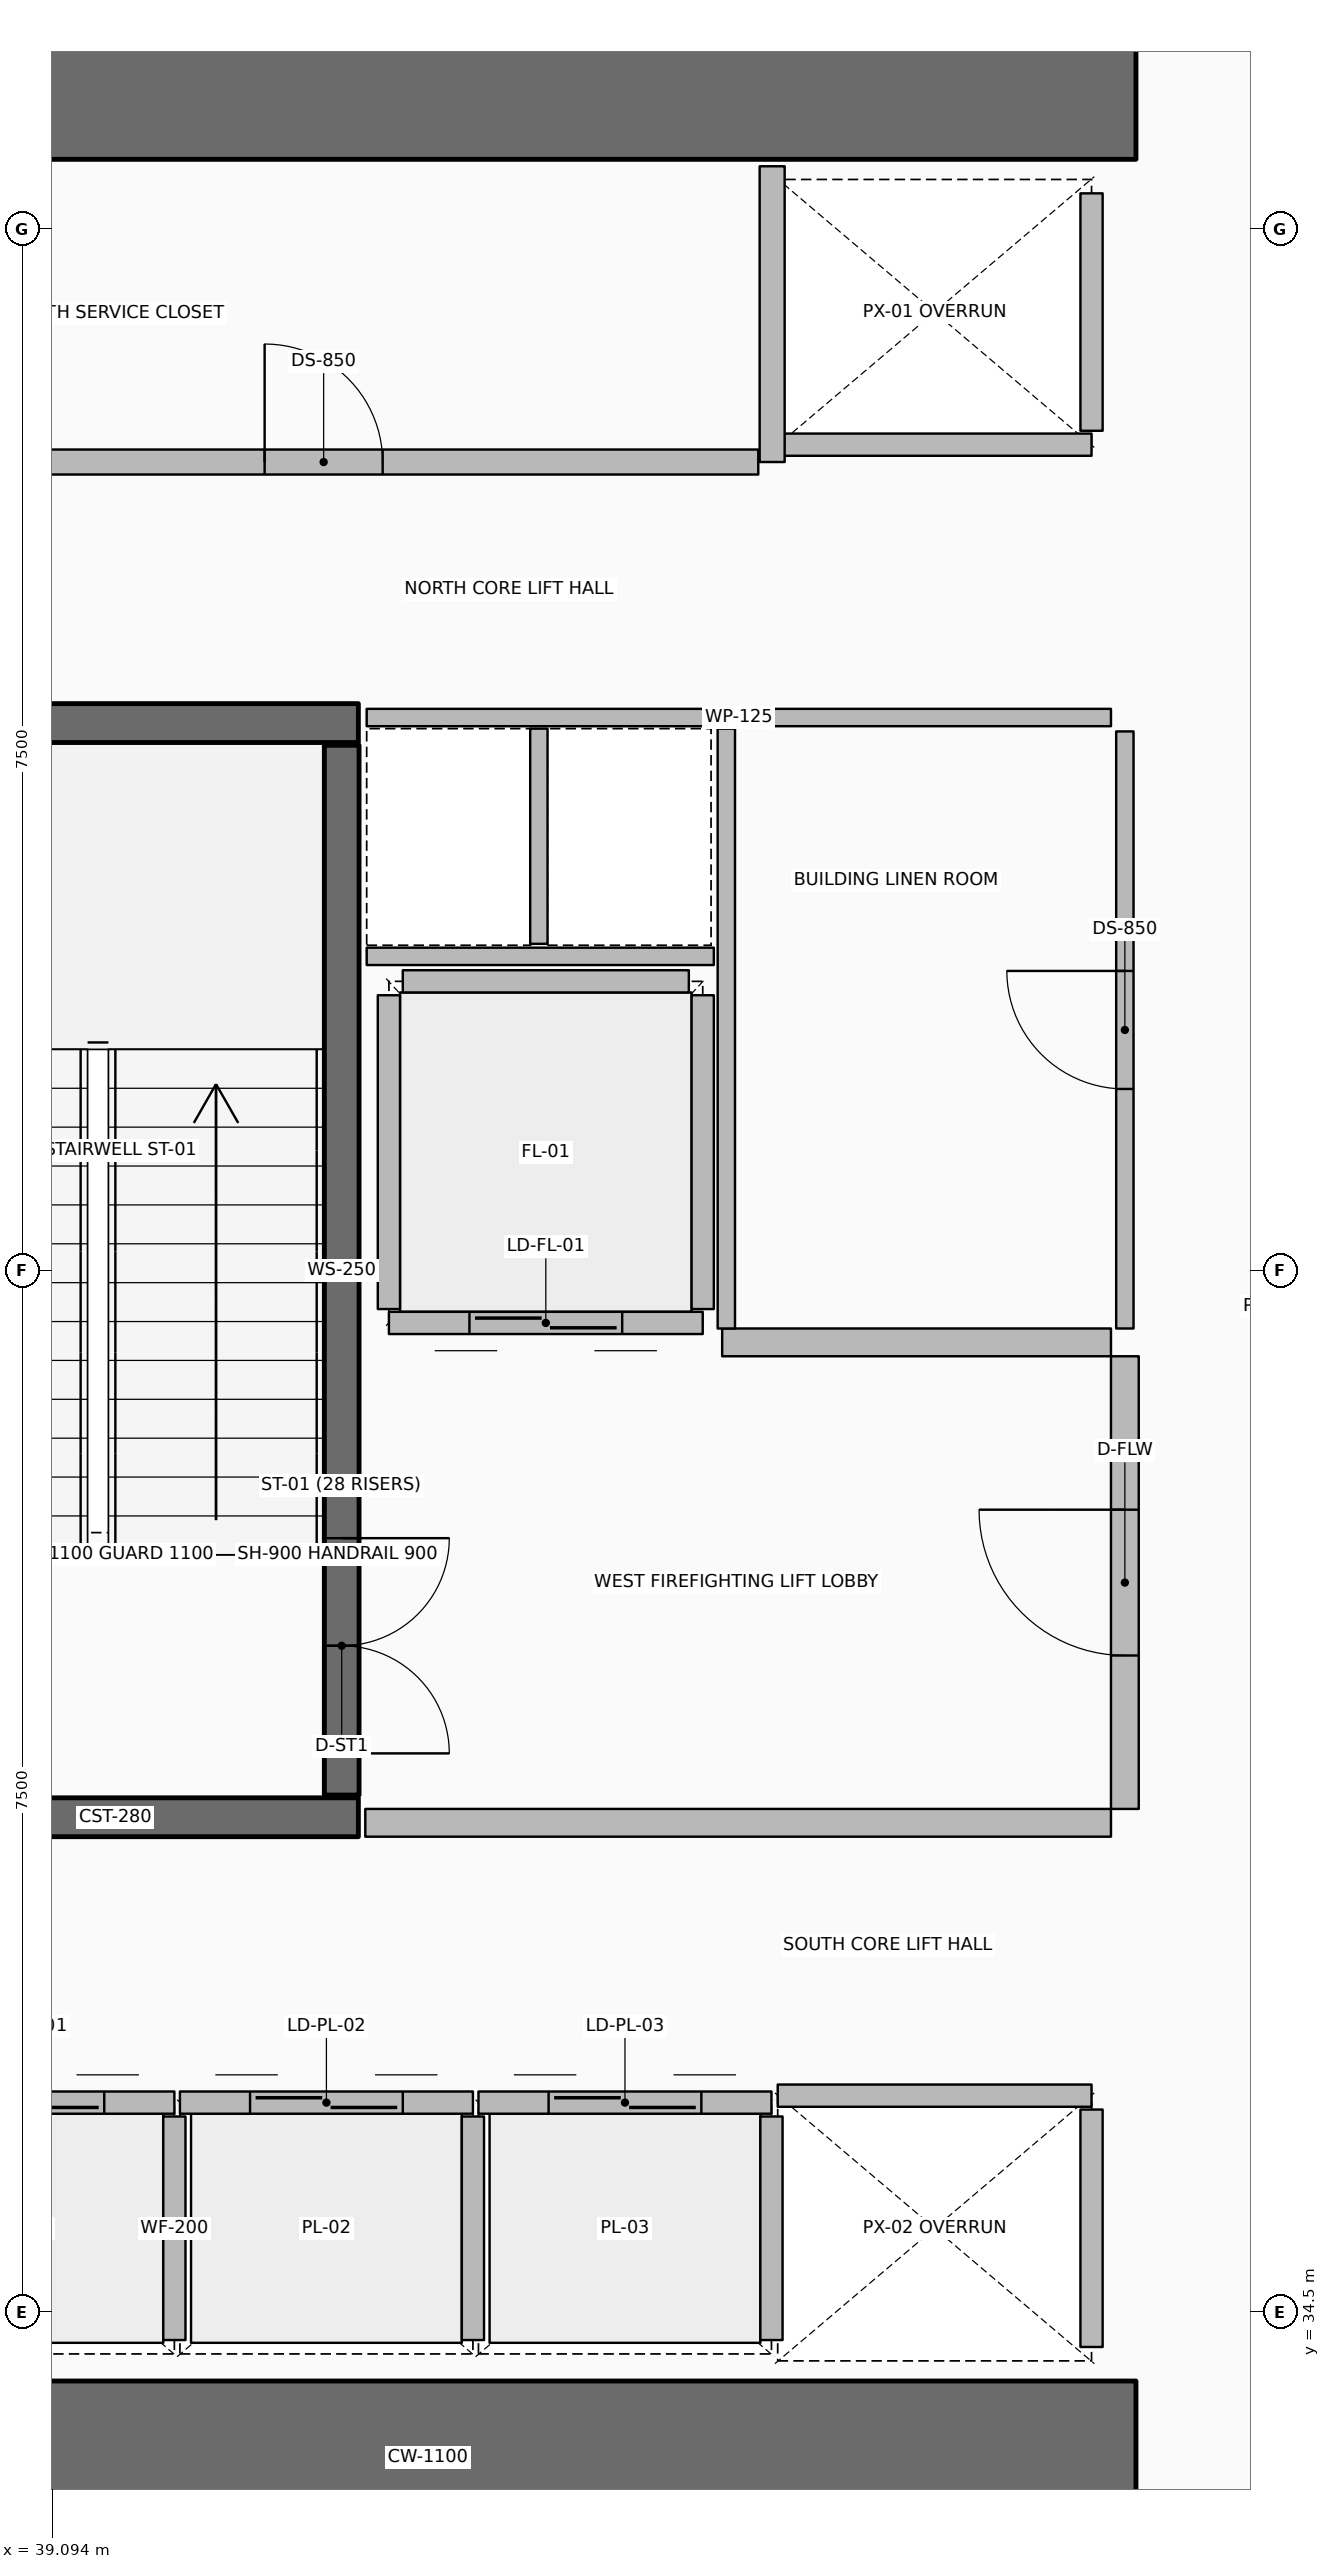
"""IFC4 building model, lengths in metres.
Left out: names, types, materials, properties, quantities, classifications, styles, units other than length and angle.
Written with IfcOpenShell. Run it as: python <this file> out.ifc"""

import sys

from ifc_helpers import new_model, si_unit, direction, frame, frame_2d, origin, origin_2d, place, context, subcontext, project, spatial, rectangle, hollow_rectangle, extrude, element, fill, save


model = new_model("IFC4")
c1 = context("Model", 3, precision=1e-05, world=origin(), true_north=direction((0.0, 1.0)))
c2 = subcontext(c1, "Body", "Model", "MODEL_VIEW")
j1 = project(units=[si_unit("LENGTHUNIT", "METRE"), si_unit("PLANEANGLEUNIT", "RADIAN")], contexts=[c1])
p1 = place(None, origin())
s1 = spatial("IfcSite", under=j1, at=p1, CompositionType="ELEMENT")
p2 = place(p1, origin())
s2 = spatial("IfcBuilding", under=s1, at=p2, CompositionType="ELEMENT")
p3 = place(p2, frame((0.0, 0.0, 7.2)))
s3 = spatial("IfcBuildingStorey", under=s2, at=p3, CompositionType="ELEMENT", Elevation=7.2)
for number, where, z_axis, x_axis in (
    (1, (36.7, 33.45, 0.0), (0.0, 0.0, 1.0), (1.0, 0.0, 0.0)),
    (2, (36.7, 50.55, 0.0), (0.0, 0.0, 1.0), (1.0, 0.0, 0.0)),
):
    element("IfcWall", number, at=place(p3, frame(where, z_axis=z_axis, x_axis=x_axis)), inside=s3, PredefinedType="SHEAR", context=c2, shape_type="SweptSolid", body=[
        extrude(rectangle(XDim=10.2, YDim=1.1, at=frame_2d((5.1, 0.0))), origin(), (0.0, 0.0, 1.0), 4.8),
    ])
for number, where, z_axis, x_axis in (
    (3, (37.8, 38.06, 0.0), (0.0, 0.0, 1.0), (1.0, 0.0, 0.0)),
    (4, (37.8, 45.94, 0.0), (0.0, 0.0, 1.0), (1.0, 0.0, 0.0)),
):
    element("IfcWall", number, at=place(p3, frame(where, z_axis=z_axis, x_axis=x_axis)), inside=s3, PredefinedType="SHEAR", context=c2, shape_type="SweptSolid", body=[
        extrude(rectangle(XDim=3.5, YDim=0.28, at=frame_2d((1.75, 0.0))), origin(), (0.0, 0.0, 1.0), 4.8),
    ])
p4 = place(p3, frame((41.18, 43.59, 0.0), z_axis=(0.0, 0.0, 1.0), x_axis=(1.0, 0.0, 0.0)))
e5 = element("IfcColumn", 5, at=p4, inside=s3, PredefinedType="COLUMN", context=c2, shape_type="SweptSolid", body=[
    extrude(hollow_rectangle(XDim=0.2, YDim=0.2, WallThickness=0.01, InnerFilletRadius=0.01, OuterFilletRadius=0.02, at=origin_2d()), origin(), (0.0, 0.0, 1.0), 2.195),
])
p5 = place(p3, frame((41.18, 38.22, 0.0), z_axis=(0.0, 0.0, 1.0), x_axis=(0.0, 1.0, 0.0)))
e6 = element("IfcWall", 6, at=p5, inside=s3, PredefinedType="SOLIDWALL", context=c2, shape_type="SweptSolid", body=[
    extrude(rectangle(XDim=7.56, YDim=0.25, at=frame_2d((3.78, 0.0))), origin(), (0.0, 0.0, 1.0), 4.48),
])
p6 = place(p5, frame((0.3, 0.0, 0.0)))
e7 = element("IfcOpeningElement", 7, at=p6, cuts=e6, PredefinedType="OPENING", context=c2, shape_type="SweptSolid", body=[
    extrude(rectangle(XDim=1.55, YDim=2.15, at=frame_2d((0.775, 1.075))), frame((0.0, 0.135, 0.0), z_axis=(0.0, -1.0, 0.0), x_axis=(1.0, 0.0, 0.0)), (0.0, 0.0, 1.0), 0.27),
])
p7 = place(p3, frame((37.865, 36.005, 0.0), z_axis=(0.0, 0.0, 1.0), x_axis=(1.0, 0.0, 0.0)))
e8 = element("IfcWall", 8, at=p7, inside=s3, PredefinedType="PARTITIONING", context=c2, shape_type="SweptSolid", body=[
    extrude(rectangle(XDim=2.11, YDim=0.16, at=frame_2d((1.055, 0.0))), origin(), (0.0, 0.0, 1.0), 4.48),
])
p8 = place(p7, frame((0.505, 0.0, 0.0)))
e9 = element("IfcOpeningElement", 9, at=p8, cuts=e8, PredefinedType="OPENING", context=c2, shape_type="SweptSolid", body=[
    extrude(rectangle(XDim=1.1, YDim=2.1, at=frame_2d((0.55, 1.05))), frame((0.0, 0.09, 0.0), z_axis=(0.0, -1.0, 0.0), x_axis=(1.0, 0.0, 0.0)), (0.0, 0.0, 1.0), 0.18),
])
p9 = place(p3, frame((39.975, 34.295, 0.0), z_axis=(0.0, 0.0, 1.0), x_axis=(0.0, 1.0, 0.0)))
e10 = element("IfcWall", 10, at=p9, inside=s3, PredefinedType="PARTITIONING", context=c2, shape_type="SweptSolid", body=[
    extrude(rectangle(XDim=1.61, YDim=0.16, at=frame_2d((0.805, 0.0))), origin(), (0.0, 0.0, 1.0), 4.48),
])
p10 = place(p3, frame((40.015, 36.005, 0.0), z_axis=(0.0, 0.0, 1.0), x_axis=(1.0, 0.0, 0.0)))
e11 = element("IfcWall", 11, at=p10, inside=s3, PredefinedType="PARTITIONING", context=c2, shape_type="SweptSolid", body=[
    extrude(rectangle(XDim=2.11, YDim=0.16, at=frame_2d((1.055, 0.0))), origin(), (0.0, 0.0, 1.0), 4.48),
])
p11 = place(p10, frame((0.505, 0.0, 0.0)))
e12 = element("IfcOpeningElement", 12, at=p11, cuts=e11, PredefinedType="OPENING", context=c2, shape_type="SweptSolid", body=[
    extrude(rectangle(XDim=1.1, YDim=2.1, at=frame_2d((0.55, 1.05))), frame((0.0, 0.09, 0.0), z_axis=(0.0, -1.0, 0.0), x_axis=(1.0, 0.0, 0.0)), (0.0, 0.0, 1.0), 0.18),
])
p12 = place(p3, frame((42.125, 34.295, 0.0), z_axis=(0.0, 0.0, 1.0), x_axis=(0.0, 1.0, 0.0)))
e13 = element("IfcWall", 13, at=p12, inside=s3, PredefinedType="PARTITIONING", context=c2, shape_type="SweptSolid", body=[
    extrude(rectangle(XDim=1.61, YDim=0.16, at=frame_2d((0.805, 0.0))), origin(), (0.0, 0.0, 1.0), 4.48),
])
p13 = place(p3, frame((42.165, 36.005, 0.0), z_axis=(0.0, 0.0, 1.0), x_axis=(1.0, 0.0, 0.0)))
e14 = element("IfcWall", 14, at=p13, inside=s3, PredefinedType="PARTITIONING", context=c2, shape_type="SweptSolid", body=[
    extrude(rectangle(XDim=2.11, YDim=0.16, at=frame_2d((1.055, 0.0))), origin(), (0.0, 0.0, 1.0), 4.48),
])
p14 = place(p13, frame((0.505, 0.0, 0.0)))
e15 = element("IfcOpeningElement", 15, at=p14, cuts=e14, PredefinedType="OPENING", context=c2, shape_type="SweptSolid", body=[
    extrude(rectangle(XDim=1.1, YDim=2.1, at=frame_2d((0.55, 1.05))), frame((0.0, 0.09, 0.0), z_axis=(0.0, -1.0, 0.0), x_axis=(1.0, 0.0, 0.0)), (0.0, 0.0, 1.0), 0.18),
])
p15 = place(p3, frame((44.275, 34.295, 0.0), z_axis=(0.0, 0.0, 1.0), x_axis=(0.0, 1.0, 0.0)))
e16 = element("IfcWall", 16, at=p15, inside=s3, PredefinedType="PARTITIONING", context=c2, shape_type="SweptSolid", body=[
    extrude(rectangle(XDim=1.61, YDim=0.16, at=frame_2d((0.805, 0.0))), origin(), (0.0, 0.0, 1.0), 4.48),
])
p16 = place(p3, frame((46.58, 47.945, 0.0), z_axis=(0.0, 0.0, 1.0), x_axis=(-1.0, 0.0, 0.0)))
e17 = element("IfcWall", 17, at=p16, inside=s3, PredefinedType="PARTITIONING", context=c2, shape_type="SweptSolid", body=[
    extrude(rectangle(XDim=2.26, YDim=0.16, at=frame_2d((1.13, 0.0))), origin(), (0.0, 0.0, 1.0), 4.48),
])
p17 = place(p3, frame((46.58, 48.045, 0.0), z_axis=(0.0, 0.0, 1.0), x_axis=(0.0, 1.0, 0.0)))
e18 = element("IfcWall", 18, at=p17, inside=s3, PredefinedType="PARTITIONING", context=c2, shape_type="SweptSolid", body=[
    extrude(rectangle(XDim=1.71, YDim=0.16, at=frame_2d((0.855, 0.0))), origin(), (0.0, 0.0, 1.0), 4.48),
])
p18 = place(p3, frame((44.32, 36.055, 0.0), z_axis=(0.0, 0.0, 1.0), x_axis=(1.0, 0.0, 0.0)))
e19 = element("IfcWall", 19, at=p18, inside=s3, PredefinedType="PARTITIONING", context=c2, shape_type="SweptSolid", body=[
    extrude(rectangle(XDim=2.26, YDim=0.16, at=frame_2d((1.13, 0.0))), origin(), (0.0, 0.0, 1.0), 4.48),
])
p19 = place(p3, frame((46.58, 34.245, 0.0), z_axis=(0.0, 0.0, 1.0), x_axis=(0.0, 1.0, 0.0)))
e20 = element("IfcWall", 20, at=p19, inside=s3, PredefinedType="PARTITIONING", context=c2, shape_type="SweptSolid", body=[
    extrude(rectangle(XDim=1.71, YDim=0.16, at=frame_2d((0.855, 0.0))), origin(), (0.0, 0.0, 1.0), 4.48),
])
p20 = place(p3, frame((43.78, 41.62, 0.0), z_axis=(0.0, 0.0, 1.0), x_axis=(-1.0, 0.0, 0.0)))
e21 = element("IfcWall", 21, at=p20, inside=s3, PredefinedType="PARTITIONING", context=c2, shape_type="SweptSolid", body=[
    extrude(rectangle(XDim=2.26, YDim=0.16, at=frame_2d((1.13, 0.0))), origin(), (0.0, 0.0, 1.0), 4.48),
])
p21 = place(p20, frame((0.58, 0.0, 0.0)))
e22 = element("IfcOpeningElement", 22, at=p21, cuts=e21, PredefinedType="OPENING", context=c2, shape_type="SweptSolid", body=[
    extrude(rectangle(XDim=1.1, YDim=2.1, at=frame_2d((0.55, 1.05))), frame((0.0, 0.09, 0.0), z_axis=(0.0, -1.0, 0.0), x_axis=(1.0, 0.0, 0.0)), (0.0, 0.0, 1.0), 0.18),
])
for number, where, z_axis, x_axis in (
    (23, (43.78, 41.72, 0.0), (0.0, 0.0, 1.0), (0.0, 1.0, 0.0)),
    (24, (41.52, 41.72, 0.0), (0.0, 0.0, 1.0), (0.0, 1.0, 0.0)),
):
    element("IfcWall", number, at=place(p3, frame(where, z_axis=z_axis, x_axis=x_axis)), inside=s3, PredefinedType="PARTITIONING", context=c2, shape_type="SweptSolid", body=[
        extrude(rectangle(XDim=2.26, YDim=0.16, at=frame_2d((1.13, 0.0))), origin(), (0.0, 0.0, 1.0), 4.48),
    ])
p22 = place(p3, frame((41.62, 44.08, 0.0), z_axis=(0.0, 0.0, 1.0), x_axis=(1.0, 0.0, 0.0)))
e25 = element("IfcWall", 25, at=p22, inside=s3, PredefinedType="PARTITIONING", context=c2, shape_type="SweptSolid", body=[
    extrude(rectangle(XDim=2.06, YDim=0.16, at=frame_2d((1.03, 0.0))), origin(), (0.0, 0.0, 1.0), 4.48),
])
p23 = place(p3, frame((37.92, 47.82, 0.0), z_axis=(0.0, 0.0, 1.0), x_axis=(1.0, 0.0, 0.0)))
e26 = element("IfcWall", 26, at=p23, inside=s3, PredefinedType="PARTITIONING", context=c2, shape_type="SweptSolid", body=[
    extrude(rectangle(XDim=6.26, YDim=0.18, at=frame_2d((3.13, 0.0))), origin(), (0.0, 0.0, 1.0), 4.48),
])
p24 = place(p23, frame((2.705, 0.0, 0.0)))
e27 = element("IfcOpeningElement", 27, at=p24, cuts=e26, PredefinedType="OPENING", context=c2, shape_type="SweptSolid", body=[
    extrude(rectangle(XDim=0.85, YDim=2.06, at=frame_2d((0.425, 1.03))), frame((0.0, 0.1, 0.0), z_axis=(0.0, -1.0, 0.0), x_axis=(1.0, 0.0, 0.0)), (0.0, 0.0, 1.0), 0.2),
])
p25 = place(p3, frame((44.28, 47.82, 0.0), z_axis=(0.0, 0.0, 1.0), x_axis=(0.0, 1.0, 0.0)))
e28 = element("IfcWall", 28, at=p25, inside=s3, PredefinedType="PARTITIONING", context=c2, shape_type="SweptSolid", body=[
    extrude(rectangle(XDim=2.13, YDim=0.18, at=frame_2d((1.065, 0.0))), origin(), (0.0, 0.0, 1.0), 4.48),
])
p26 = place(p3, frame((41.35, 38.02, 0.0), z_axis=(0.0, 0.0, 1.0), x_axis=(1.0, 0.0, 0.0)))
e29 = element("IfcWall", 29, at=p26, inside=s3, PredefinedType="PARTITIONING", context=c2, shape_type="SweptSolid", body=[
    extrude(rectangle(XDim=5.37, YDim=0.2, at=frame_2d((2.685, 0.0))), origin(), (0.0, 0.0, 1.0), 4.48),
])
p27 = place(p3, frame((43.92, 41.48, 0.0), z_axis=(0.0, 0.0, 1.0), x_axis=(1.0, 0.0, 0.0)))
e30 = element("IfcWall", 30, at=p27, inside=s3, PredefinedType="PARTITIONING", context=c2, shape_type="SweptSolid", body=[
    extrude(rectangle(XDim=2.8, YDim=0.2, at=frame_2d((1.4, 0.0))), origin(), (0.0, 0.0, 1.0), 4.48),
])
p28 = place(p3, frame((46.82, 38.12, 0.0), z_axis=(0.0, 0.0, 1.0), x_axis=(0.0, 1.0, 0.0)))
e31 = element("IfcWall", 31, at=p28, inside=s3, PredefinedType="PARTITIONING", context=c2, shape_type="SweptSolid", body=[
    extrude(rectangle(XDim=3.26, YDim=0.2, at=frame_2d((1.63, 0.0))), origin(), (0.0, 0.0, 1.0), 4.48),
])
p29 = place(p28, frame((1.105, 0.0, 0.0)))
e32 = element("IfcOpeningElement", 32, at=p29, cuts=e31, PredefinedType="OPENING", context=c2, shape_type="SweptSolid", body=[
    extrude(rectangle(XDim=1.05, YDim=2.1, at=frame_2d((0.525, 1.05))), frame((0.0, 0.11, 0.0), z_axis=(0.0, -1.0, 0.0), x_axis=(1.0, 0.0, 0.0)), (0.0, 0.0, 1.0), 0.22),
])
p30 = place(p3, frame((41.36, 45.98, 0.0), z_axis=(0.0, 0.0, 1.0), x_axis=(1.0, 0.0, 0.0)))
e33 = element("IfcWall", 33, at=p30, inside=s3, PredefinedType="PARTITIONING", context=c2, shape_type="SweptSolid", body=[
    extrude(rectangle(XDim=5.36, YDim=0.125, at=frame_2d((2.68, 0.0))), origin(), (0.0, 0.0, 1.0), 3.92),
])
p31 = place(p3, frame((41.36, 44.26, 0.0), z_axis=(0.0, 0.0, 1.0), x_axis=(1.0, 0.0, 0.0)))
e34 = element("IfcWall", 34, at=p31, inside=s3, PredefinedType="PARTITIONING", context=c2, shape_type="SweptSolid", body=[
    extrude(rectangle(XDim=2.5, YDim=0.125, at=frame_2d((1.25, 0.0))), origin(), (0.0, 0.0, 1.0), 3.92),
])
p32 = place(p3, frame((42.6, 44.35, 0.0), z_axis=(0.0, 0.0, 1.0), x_axis=(0.0, 1.0, 0.0)))
e35 = element("IfcWall", 35, at=p32, inside=s3, PredefinedType="PARTITIONING", context=c2, shape_type="SweptSolid", body=[
    extrude(rectangle(XDim=1.55, YDim=0.125, at=frame_2d((0.775, 0.0))), origin(), (0.0, 0.0, 1.0), 3.92),
])
p33 = place(p3, frame((43.95, 41.58, 0.0), z_axis=(0.0, 0.0, 1.0), x_axis=(0.0, 1.0, 0.0)))
e36 = element("IfcWall", 36, at=p33, inside=s3, PredefinedType="PARTITIONING", context=c2, shape_type="SweptSolid", body=[
    extrude(rectangle(XDim=4.32, YDim=0.125, at=frame_2d((2.16, 0.0))), origin(), (0.0, 0.0, 1.0), 3.92),
])
p34 = place(p3, frame((46.82, 41.58, 0.0), z_axis=(0.0, 0.0, 1.0), x_axis=(0.0, 1.0, 0.0)))
e37 = element("IfcWall", 37, at=p34, inside=s3, PredefinedType="PARTITIONING", context=c2, shape_type="SweptSolid", body=[
    extrude(rectangle(XDim=4.3, YDim=0.125, at=frame_2d((2.15, 0.0))), origin(), (0.0, 0.0, 1.0), 3.92),
])
p35 = place(p34, frame((1.725, 0.0, 0.0)))
e38 = element("IfcOpeningElement", 38, at=p35, cuts=e37, PredefinedType="OPENING", context=c2, shape_type="SweptSolid", body=[
    extrude(rectangle(XDim=0.85, YDim=2.06, at=frame_2d((0.425, 1.03))), frame((0.0, 0.073, 0.0), z_axis=(0.0, -1.0, 0.0), x_axis=(1.0, 0.0, 0.0)), (0.0, 0.0, 1.0), 0.145),
])
p36 = place(p6, origin())
e39 = element("IfcDoor", 39, at=p36, inside=s3, OperationType="DOUBLE_DOOR_SINGLE_SWING", PredefinedType="DOOR", context=c2, shape_type="SweptSolid", body=[
    extrude(rectangle(XDim=1.55, YDim=2.15, at=frame_2d((0.775, 1.075))), frame((0.0, 0.025, 0.0), z_axis=(0.0, -1.0, 0.0), x_axis=(1.0, 0.0, 0.0)), (0.0, 0.0, 1.0), 0.05),
])
fill(e7, e39)
p37 = place(p8, origin())
e40 = element("IfcDoor", 40, at=p37, inside=s3, OperationType="DOUBLE_DOOR_SLIDING", PredefinedType="DOOR", context=c2, shape_type="SweptSolid", body=[
    extrude(rectangle(XDim=1.1, YDim=2.1, at=frame_2d((0.55, 1.05))), frame((0.0, 0.025, 0.0), z_axis=(0.0, -1.0, 0.0), x_axis=(1.0, 0.0, 0.0)), (0.0, 0.0, 1.0), 0.05),
])
fill(e9, e40)
p38 = place(p11, origin())
e41 = element("IfcDoor", 41, at=p38, inside=s3, OperationType="DOUBLE_DOOR_SLIDING", PredefinedType="DOOR", context=c2, shape_type="SweptSolid", body=[
    extrude(rectangle(XDim=1.1, YDim=2.1, at=frame_2d((0.55, 1.05))), frame((0.0, 0.025, 0.0), z_axis=(0.0, -1.0, 0.0), x_axis=(1.0, 0.0, 0.0)), (0.0, 0.0, 1.0), 0.05),
])
fill(e12, e41)
p39 = place(p14, origin())
e42 = element("IfcDoor", 42, at=p39, inside=s3, OperationType="DOUBLE_DOOR_SLIDING", PredefinedType="DOOR", context=c2, shape_type="SweptSolid", body=[
    extrude(rectangle(XDim=1.1, YDim=2.1, at=frame_2d((0.55, 1.05))), frame((0.0, 0.025, 0.0), z_axis=(0.0, -1.0, 0.0), x_axis=(1.0, 0.0, 0.0)), (0.0, 0.0, 1.0), 0.05),
])
fill(e15, e42)
p40 = place(p21, origin())
e43 = element("IfcDoor", 43, at=p40, inside=s3, OperationType="DOUBLE_DOOR_SLIDING", PredefinedType="DOOR", context=c2, shape_type="SweptSolid", body=[
    extrude(rectangle(XDim=1.1, YDim=2.1, at=frame_2d((0.55, 1.05))), frame((0.0, 0.025, 0.0), z_axis=(0.0, -1.0, 0.0), x_axis=(1.0, 0.0, 0.0)), (0.0, 0.0, 1.0), 0.05),
])
fill(e22, e43)
p41 = place(p24, origin())
e44 = element("IfcDoor", 44, at=p41, inside=s3, OperationType="SINGLE_SWING_LEFT", PredefinedType="DOOR", context=c2, shape_type="SweptSolid", body=[
    extrude(rectangle(XDim=0.85, YDim=2.06, at=frame_2d((0.425, 1.03))), frame((0.0, 0.025, 0.0), z_axis=(0.0, -1.0, 0.0), x_axis=(1.0, 0.0, 0.0)), (0.0, 0.0, 1.0), 0.05),
])
fill(e27, e44)
p42 = place(p29, origin())
e45 = element("IfcDoor", 45, at=p42, inside=s3, OperationType="SINGLE_SWING_RIGHT", PredefinedType="DOOR", context=c2, shape_type="SweptSolid", body=[
    extrude(rectangle(XDim=1.05, YDim=2.1, at=frame_2d((0.525, 1.05))), frame((0.0, 0.025, 0.0), z_axis=(0.0, -1.0, 0.0), x_axis=(1.0, 0.0, 0.0)), (0.0, 0.0, 1.0), 0.05),
])
fill(e32, e45)
p43 = place(p35, origin())
e46 = element("IfcDoor", 46, at=p43, inside=s3, OperationType="SINGLE_SWING_RIGHT", PredefinedType="DOOR", context=c2, shape_type="SweptSolid", body=[
    extrude(rectangle(XDim=0.85, YDim=2.06, at=frame_2d((0.425, 1.03))), frame((0.0, 0.025, 0.0), z_axis=(0.0, -1.0, 0.0), x_axis=(1.0, 0.0, 0.0)), (0.0, 0.0, 1.0), 0.05),
])
fill(e38, e46)
save(model, sys.argv[1])
